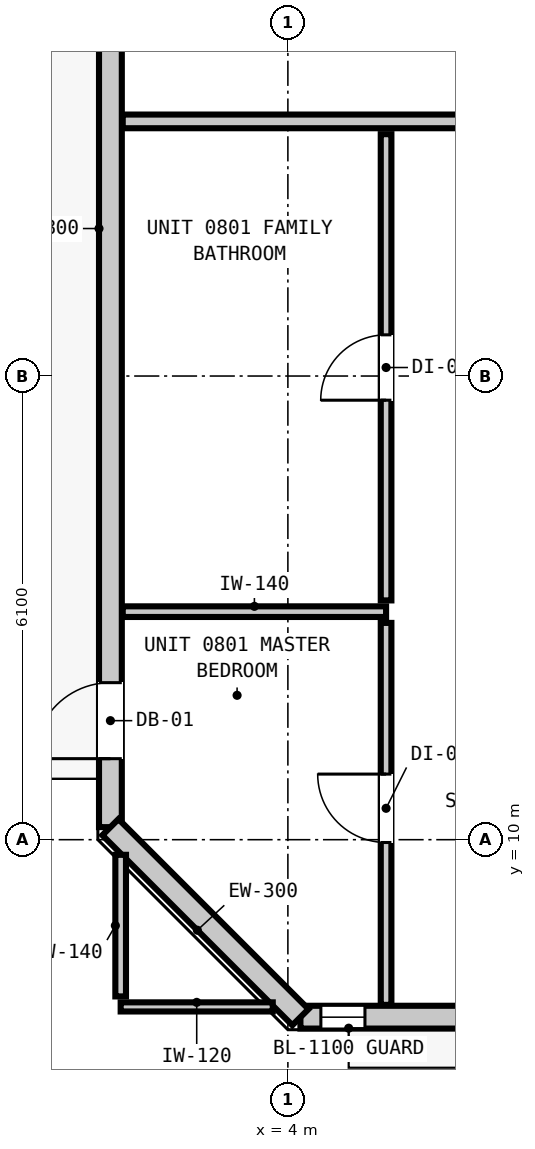
"""IFC4 building model, lengths in metres.
Left out: names, types, materials, properties, quantities, classifications, styles, units other than length and angle.
Written with IfcOpenShell. Run it as: python <this file> out.ifc"""

import sys

from ifc_helpers import new_model, si_unit, direction, frame, frame_2d, origin, place, context, subcontext, project, spatial, rectangle, extrude, element, fill, save


model = new_model("IFC4")
c1 = context("Model", 3, precision=1e-05, world=origin(), true_north=direction((0.0, 1.0)))
c2 = subcontext(c1, "Body", "Model", "MODEL_VIEW")
j1 = project(units=[si_unit("LENGTHUNIT", "METRE"), si_unit("PLANEANGLEUNIT", "RADIAN")], contexts=[c1])
p1 = place(None, origin())
s1 = spatial("IfcSite", under=j1, at=p1, CompositionType="ELEMENT")
p2 = place(p1, origin())
s2 = spatial("IfcBuilding", under=s1, at=p2, CompositionType="ELEMENT")
p3 = place(p2, frame((0.0, 0.0, 31.96)))
s3 = spatial("IfcBuildingStorey", under=s2, at=p3, CompositionType="ELEMENT", Elevation=31.96)
p4 = place(p3, frame((1.665, 10.165, 0.0), z_axis=(0.0, 0.0, 1.0), x_axis=(0.0, 1.0, 0.0)))
e1 = element("IfcWall", 1, at=p4, inside=s3, PredefinedType="STANDARD", context=c2, shape_type="SweptSolid", body=[
    extrude(rectangle(XDim=34.67, YDim=0.3, at=frame_2d((17.335, 0.0))), origin(), (0.0, 0.0, 1.0), 3.06),
])
p5 = place(p4, frame((0.901, 0.0, 0.0)))
e2 = element("IfcOpeningElement", 2, at=p5, cuts=e1, PredefinedType="OPENING", context=c2, shape_type="SweptSolid", body=[
    extrude(rectangle(XDim=1.0, YDim=2.15, at=frame_2d((0.5, 1.075))), frame((0.0, 0.16, 0.0), z_axis=(0.0, -1.0, 0.0), x_axis=(1.0, 0.0, 0.0)), (0.0, 0.0, 1.0), 0.32),
])
p6 = place(p4, frame((17.7, 0.0, 0.85)))
e3 = element("IfcOpeningElement", 3, at=p6, cuts=e1, PredefinedType="OPENING", context=c2, shape_type="SweptSolid", body=[
    extrude(rectangle(XDim=1.35, YDim=1.85, at=frame_2d((0.675, 0.925))), frame((0.0, 0.16, 0.0), z_axis=(0.0, -1.0, 0.0), x_axis=(1.0, 0.0, 0.0)), (0.0, 0.0, 1.0), 0.32),
])
p7 = place(p4, frame((13.85, 0.0, 0.85)))
e4 = element("IfcOpeningElement", 4, at=p7, cuts=e1, PredefinedType="OPENING", context=c2, shape_type="SweptSolid", body=[
    extrude(rectangle(XDim=1.35, YDim=1.85, at=frame_2d((0.675, 0.925))), frame((0.0, 0.16, 0.0), z_axis=(0.0, -1.0, 0.0), x_axis=(1.0, 0.0, 0.0)), (0.0, 0.0, 1.0), 0.32),
])
p8 = place(p4, frame((25.87, 0.0, 0.85)))
e5 = element("IfcOpeningElement", 5, at=p8, cuts=e1, PredefinedType="OPENING", context=c2, shape_type="SweptSolid", body=[
    extrude(rectangle(XDim=1.35, YDim=1.85, at=frame_2d((0.675, 0.925))), frame((0.0, 0.16, 0.0), z_axis=(0.0, -1.0, 0.0), x_axis=(1.0, 0.0, 0.0)), (0.0, 0.0, 1.0), 0.32),
])
p9 = place(p3, frame((41.635, 7.665, 0.0), z_axis=(0.0, 0.0, 1.0), x_axis=(-1.0, 0.0, 0.0)))
e6 = element("IfcWall", 6, at=p9, inside=s3, PredefinedType="STANDARD", context=c2, shape_type="SweptSolid", body=[
    extrude(rectangle(XDim=37.47, YDim=0.3, at=frame_2d((18.735, 0.0))), origin(), (0.0, 0.0, 1.0), 3.06),
])
p10 = place(p9, frame((0.901, 0.0, 0.0)))
e7 = element("IfcOpeningElement", 7, at=p10, cuts=e6, PredefinedType="OPENING", context=c2, shape_type="SweptSolid", body=[
    extrude(rectangle(XDim=1.0, YDim=2.15, at=frame_2d((0.5, 1.075))), frame((0.0, 0.16, 0.0), z_axis=(0.0, -1.0, 0.0), x_axis=(1.0, 0.0, 0.0)), (0.0, 0.0, 1.0), 0.32),
])
p11 = place(p9, frame((32.47, 0.0, 0.85)))
e8 = element("IfcOpeningElement", 8, at=p11, cuts=e6, PredefinedType="OPENING", context=c2, shape_type="SweptSolid", body=[
    extrude(rectangle(XDim=1.35, YDim=1.85, at=frame_2d((0.675, 0.925))), frame((0.0, 0.16, 0.0), z_axis=(0.0, -1.0, 0.0), x_axis=(1.0, 0.0, 0.0)), (0.0, 0.0, 1.0), 0.32),
])
p12 = place(p9, frame((36.621, 0.0, 0.85)))
e9 = element("IfcOpeningElement", 9, at=p12, cuts=e6, PredefinedType="OPENING", context=c2, shape_type="SweptSolid", body=[
    extrude(rectangle(XDim=0.58, YDim=1.5, at=frame_2d((0.29, 0.75))), frame((0.0, 0.16, 0.0), z_axis=(0.0, -1.0, 0.0), x_axis=(1.0, 0.0, 0.0)), (0.0, 0.0, 1.0), 0.32),
])
p13 = place(p9, frame((25.17, 0.0, 0.85)))
e10 = element("IfcOpeningElement", 10, at=p13, cuts=e6, PredefinedType="OPENING", context=c2, shape_type="SweptSolid", body=[
    extrude(rectangle(XDim=1.35, YDim=1.85, at=frame_2d((0.675, 0.925))), frame((0.0, 0.16, 0.0), z_axis=(0.0, -1.0, 0.0), x_axis=(1.0, 0.0, 0.0)), (0.0, 0.0, 1.0), 0.32),
])
p14 = place(p9, frame((22.07, 0.0, 0.85)))
e11 = element("IfcOpeningElement", 11, at=p14, cuts=e6, PredefinedType="OPENING", context=c2, shape_type="SweptSolid", body=[
    extrude(rectangle(XDim=1.35, YDim=1.85, at=frame_2d((0.675, 0.925))), frame((0.0, 0.16, 0.0), z_axis=(0.0, -1.0, 0.0), x_axis=(1.0, 0.0, 0.0)), (0.0, 0.0, 1.0), 0.32),
])
p15 = place(p9, frame((8.11, 0.0, 0.85)))
e12 = element("IfcOpeningElement", 12, at=p15, cuts=e6, PredefinedType="OPENING", context=c2, shape_type="SweptSolid", body=[
    extrude(rectangle(XDim=1.35, YDim=1.85, at=frame_2d((0.675, 0.925))), frame((0.0, 0.16, 0.0), z_axis=(0.0, -1.0, 0.0), x_axis=(1.0, 0.0, 0.0)), (0.0, 0.0, 1.0), 0.32),
])
p16 = place(p9, frame((16.094, 0.0, 0.85)))
e13 = element("IfcOpeningElement", 13, at=p16, cuts=e6, PredefinedType="OPENING", context=c2, shape_type="SweptSolid", body=[
    extrude(rectangle(XDim=1.35, YDim=1.85, at=frame_2d((0.675, 0.925))), frame((0.0, 0.16, 0.0), z_axis=(0.0, -1.0, 0.0), x_axis=(1.0, 0.0, 0.0)), (0.0, 0.0, 1.0), 0.32),
])
p17 = place(p3, frame((4.165, 7.665, 0.0), z_axis=(0.0, 0.0, 1.0), x_axis=(-0.707106781187, 0.707106781187, 0.0)))
e14 = element("IfcWall", 14, at=p17, inside=s3, PredefinedType="STANDARD", context=c2, shape_type="SweptSolid", body=[
    extrude(rectangle(XDim=3.536, YDim=0.3, at=frame_2d((1.768, 0.0))), origin(), (0.0, 0.0, 1.0), 3.06),
])
p18 = place(p3, frame((1.827, 19.45, 0.0), z_axis=(0.0, 0.0, 1.0), x_axis=(1.0, 0.0, 0.0)))
e15 = element("IfcWall", 15, at=p18, inside=s3, PredefinedType="PARTITIONING", context=c2, shape_type="SweptSolid", body=[
    extrude(rectangle(XDim=42.146, YDim=0.18, at=frame_2d((21.073, 0.0))), origin(), (0.0, 0.0, 1.0), 3.06),
])
p19 = place(p18, frame((8.602, 0.0, 0.0)))
e16 = element("IfcOpeningElement", 16, at=p19, cuts=e15, PredefinedType="OPENING", context=c2, shape_type="SweptSolid", body=[
    extrude(rectangle(XDim=1.0, YDim=2.15, at=frame_2d((0.5, 1.075))), frame((0.0, 0.1, 0.0), z_axis=(0.0, -1.0, 0.0), x_axis=(1.0, 0.0, 0.0)), (0.0, 0.0, 1.0), 0.2),
])
p20 = place(p18, frame((30.475, 0.0, 0.0)))
e17 = element("IfcOpeningElement", 17, at=p20, cuts=e15, PredefinedType="OPENING", context=c2, shape_type="SweptSolid", body=[
    extrude(rectangle(XDim=1.0, YDim=2.15, at=frame_2d((0.5, 1.075))), frame((0.0, 0.1, 0.0), z_axis=(0.0, -1.0, 0.0), x_axis=(1.0, 0.0, 0.0)), (0.0, 0.0, 1.0), 0.2),
])
p21 = place(p3, frame((1.827, 13.0, 0.0), z_axis=(0.0, 0.0, 1.0), x_axis=(1.0, 0.0, 0.0)))
e18 = element("IfcWall", 18, at=p21, inside=s3, PredefinedType="PARTITIONING", context=c2, shape_type="SweptSolid", body=[
    extrude(rectangle(XDim=3.465, YDim=0.14, at=frame_2d((1.732, 0.0))), origin(), (0.0, 0.0, 1.0), 3.06),
])
p22 = place(p3, frame((1.8, 7.8, 0.0), z_axis=(0.0, 0.0, 1.0), x_axis=(1.0, 0.0, 0.0)))
e19 = element("IfcWall", 19, at=p22, inside=s3, PredefinedType="PARTITIONING", context=c2, shape_type="SweptSolid", body=[
    extrude(rectangle(XDim=2.001, YDim=0.12, at=frame_2d((1.0, 0.0))), origin(), (0.0, 0.0, 1.0), 3.06),
])
p23 = place(p3, frame((1.8, 7.938, 0.0), z_axis=(0.0, 0.0, 1.0), x_axis=(0.0, 1.0, 0.0)))
e20 = element("IfcWall", 20, at=p23, inside=s3, PredefinedType="PARTITIONING", context=c2, shape_type="SweptSolid", body=[
    extrude(rectangle(XDim=1.863, YDim=0.14, at=frame_2d((0.932, 0.0))), origin(), (0.0, 0.0, 1.0), 3.06),
])
p24 = place(p3, frame((5.292, 7.827, 0.0), z_axis=(0.0, 0.0, 1.0), x_axis=(0.0, 1.0, 0.0)))
e21 = element("IfcWall", 21, at=p24, inside=s3, PredefinedType="PARTITIONING", context=c2, shape_type="SweptSolid", body=[
    extrude(rectangle(XDim=5.025, YDim=0.14, at=frame_2d((2.513, 0.0))), origin(), (0.0, 0.0, 1.0), 3.06),
])
p25 = place(p24, frame((2.136, 0.0, 0.0)))
e22 = element("IfcOpeningElement", 22, at=p25, cuts=e21, PredefinedType="OPENING", context=c2, shape_type="SweptSolid", body=[
    extrude(rectangle(XDim=0.9, YDim=2.1, at=frame_2d((0.45, 1.05))), frame((0.0, 0.08, 0.0), z_axis=(0.0, -1.0, 0.0), x_axis=(1.0, 0.0, 0.0)), (0.0, 0.0, 1.0), 0.16),
])
p26 = place(p3, frame((5.292, 13.148, 0.0), z_axis=(0.0, 0.0, 1.0), x_axis=(0.0, 1.0, 0.0)))
e23 = element("IfcWall", 23, at=p26, inside=s3, PredefinedType="PARTITIONING", context=c2, shape_type="SweptSolid", body=[
    extrude(rectangle(XDim=6.134, YDim=0.14, at=frame_2d((3.067, 0.0))), origin(), (0.0, 0.0, 1.0), 3.06),
])
p27 = place(p26, frame((2.634, 0.0, 0.0)))
e24 = element("IfcOpeningElement", 24, at=p27, cuts=e23, PredefinedType="OPENING", context=c2, shape_type="SweptSolid", body=[
    extrude(rectangle(XDim=0.86, YDim=2.02, at=frame_2d((0.43, 1.01))), frame((0.0, 0.08, 0.0), z_axis=(0.0, -1.0, 0.0), x_axis=(1.0, 0.0, 0.0)), (0.0, 0.0, 1.0), 0.16),
])
p28 = place(p5, origin())
e25 = element("IfcDoor", 25, at=p28, inside=s3, OperationType="SINGLE_SWING_LEFT", PredefinedType="DOOR", context=c2, shape_type="SweptSolid", body=[
    extrude(rectangle(XDim=1.0, YDim=2.15, at=frame_2d((0.5, 1.075))), frame((0.0, 0.025, 0.0), z_axis=(0.0, -1.0, 0.0), x_axis=(1.0, 0.0, 0.0)), (0.0, 0.0, 1.0), 0.05),
])
fill(e2, e25)
p29 = place(p12, origin())
e26 = element("IfcWindow", 26, at=p29, inside=s3, PartitioningType="SINGLE_PANEL", PredefinedType="WINDOW", context=c2, shape_type="SweptSolid", body=[
    extrude(rectangle(XDim=0.58, YDim=1.5, at=frame_2d((0.29, 0.75))), frame((0.0, 0.03, 0.0), z_axis=(0.0, -1.0, 0.0), x_axis=(1.0, 0.0, 0.0)), (0.0, 0.0, 1.0), 0.06),
])
fill(e9, e26)
p30 = place(p27, origin())
e27 = element("IfcDoor", 27, at=p30, inside=s3, OperationType="SINGLE_SWING_LEFT", PredefinedType="DOOR", context=c2, shape_type="SweptSolid", body=[
    extrude(rectangle(XDim=0.86, YDim=2.02, at=frame_2d((0.43, 1.01))), frame((0.0, 0.025, 0.0), z_axis=(0.0, -1.0, 0.0), x_axis=(1.0, 0.0, 0.0)), (0.0, 0.0, 1.0), 0.05),
])
fill(e24, e27)
p31 = place(p25, origin())
e28 = element("IfcDoor", 28, at=p31, inside=s3, OperationType="SINGLE_SWING_RIGHT", PredefinedType="DOOR", context=c2, shape_type="SweptSolid", body=[
    extrude(rectangle(XDim=0.9, YDim=2.1, at=frame_2d((0.45, 1.05))), frame((0.0, 0.025, 0.0), z_axis=(0.0, -1.0, 0.0), x_axis=(1.0, 0.0, 0.0)), (0.0, 0.0, 1.0), 0.05),
])
fill(e22, e28)
save(model, sys.argv[1])
